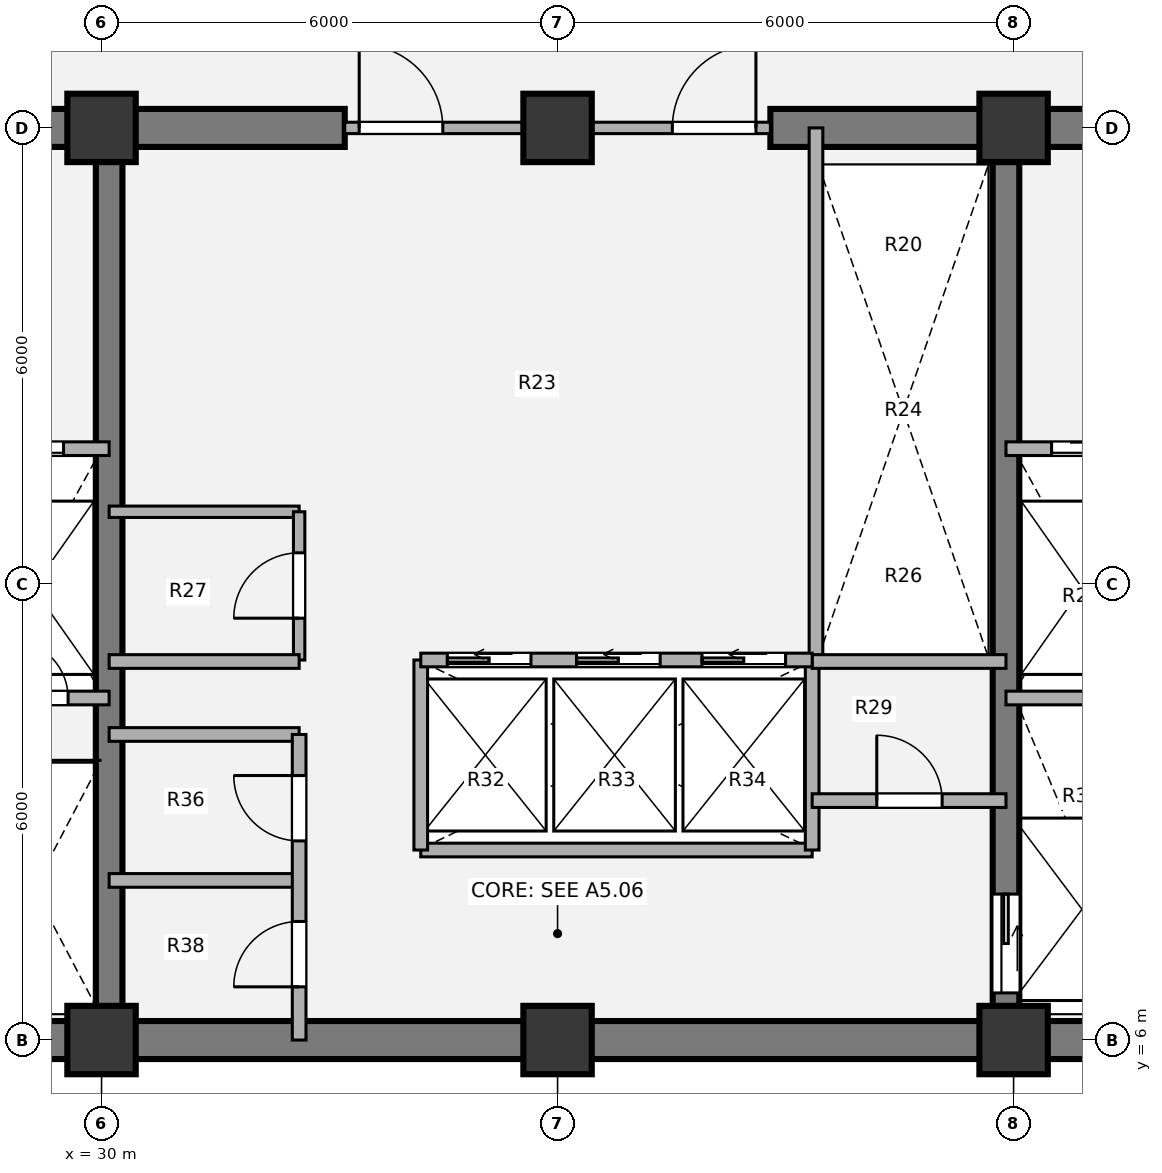
"""IFC4 building model, lengths in metres.
Left out: names, types, materials, properties, quantities, classifications, styles, units other than length and angle.
Written with IfcOpenShell. Run it as: python <this file> out.ifc"""

import sys

from ifc_helpers import new_model, si_unit, direction, frame, frame_2d, origin, origin_2d, place, context, subcontext, project, spatial, rectangle, extrude, source, transform, mapped, element, fill, save


model = new_model("IFC4")
c1 = context("Model", 3, precision=1e-05, world=origin(), true_north=direction((0.0, 1.0)))
c2 = subcontext(c1, "Body", "Model", "MODEL_VIEW")
j1 = project(units=[si_unit("LENGTHUNIT", "METRE"), si_unit("PLANEANGLEUNIT", "RADIAN")], contexts=[c1])
p1 = place(None, origin())
s1 = spatial("IfcSite", under=j1, at=p1, CompositionType="ELEMENT")
p2 = place(p1, origin())
s2 = spatial("IfcBuilding", under=s1, at=p2, CompositionType="ELEMENT")
p3 = place(p2, frame((0.0, 0.0, 138.96)))
s3 = spatial("IfcBuildingStorey", under=s2, at=p3, CompositionType="ELEMENT", Elevation=138.96)
m1 = source(origin(), c2, "Body", "SweptSolid", [
    extrude(rectangle(XDim=0.9, YDim=0.9, at=origin_2d()), origin(), (0.0, 0.0, 1.0), 3.78),
])
for number, where, z_axis, x_axis in (
    (1, (30.0, 6.0, 0.0), (0.0, 0.0, 1.0), (1.0, 0.0, 0.0)),
    (2, (36.0, 6.0, 0.0), (0.0, 0.0, 1.0), (1.0, 0.0, 0.0)),
    (3, (42.0, 6.0, 0.0), (0.0, 0.0, 1.0), (1.0, 0.0, 0.0)),
    (4, (30.0, 18.0, 0.0), (0.0, 0.0, 1.0), (1.0, 0.0, 0.0)),
    (5, (36.0, 18.0, 0.0), (0.0, 0.0, 1.0), (1.0, 0.0, 0.0)),
    (6, (42.0, 18.0, 0.0), (0.0, 0.0, 1.0), (1.0, 0.0, 0.0)),
):
    element("IfcColumn", number, at=place(p3, frame(where, z_axis=z_axis, x_axis=x_axis)), inside=s3, PredefinedType="COLUMN", context=c2, shape_type="MappedRepresentation", body=[
        mapped(m1, transform((0.0, 0.0, 0.0), x_axis=(1.0, 0.0, 0.0), y_axis=(0.0, 1.0, 0.0), z_axis=(0.0, 0.0, 1.0), scale=1.0)),
    ])
p4 = place(p3, frame((48.25, 6.0, 0.0), z_axis=(0.0, 0.0, 1.0), x_axis=(-1.0, 0.0, 0.0)))
e7 = element("IfcWall", 7, at=p4, inside=s3, PredefinedType="SHEAR", context=c2, shape_type="SweptSolid", body=[
    extrude(rectangle(XDim=24.5, YDim=0.5, at=frame_2d((12.25, 0.0))), origin(), (0.0, 0.0, 1.0), 3.78),
])
p5 = place(p3, frame((23.75, 18.0, 0.0), z_axis=(0.0, 0.0, 1.0), x_axis=(1.0, 0.0, 0.0)))
e8 = element("IfcWall", 8, at=p5, inside=s3, PredefinedType="SHEAR", context=c2, shape_type="SweptSolid", body=[
    extrude(rectangle(XDim=9.45, YDim=0.5, at=frame_2d((4.725, 0.0))), origin(), (0.0, 0.0, 1.0), 3.78),
])
p6 = place(p5, frame((2.95, 0.0, 0.0)))
e9 = element("IfcOpeningElement", 9, at=p6, cuts=e8, PredefinedType="OPENING", context=c2, shape_type="SweptSolid", body=[
    extrude(rectangle(XDim=1.1, YDim=2.1, at=origin_2d()), frame((0.55, 0.26, 1.05), z_axis=(0.0, -1.0, 0.0), x_axis=(1.0, 0.0, 0.0)), (0.0, 0.0, 1.0), 0.52),
])
p7 = place(p3, frame((38.8, 18.0, 0.0), z_axis=(0.0, 0.0, 1.0), x_axis=(1.0, 0.0, 0.0)))
e10 = element("IfcWall", 10, at=p7, inside=s3, PredefinedType="SHEAR", context=c2, shape_type="SweptSolid", body=[
    extrude(rectangle(XDim=9.45, YDim=0.5, at=frame_2d((4.725, 0.0))), origin(), (0.0, 0.0, 1.0), 3.78),
])
p8 = place(p7, frame((5.45, 0.0, 0.0)))
e11 = element("IfcOpeningElement", 11, at=p8, cuts=e10, PredefinedType="OPENING", context=c2, shape_type="SweptSolid", body=[
    extrude(rectangle(XDim=1.1, YDim=2.1, at=origin_2d()), frame((0.55, 0.26, 1.05), z_axis=(0.0, -1.0, 0.0), x_axis=(1.0, 0.0, 0.0)), (0.0, 0.0, 1.0), 0.52),
])
p9 = place(p3, frame((30.1, 6.0, 0.0), z_axis=(0.0, 0.0, 1.0), x_axis=(0.0, 1.0, 0.0)))
e12 = element("IfcWall", 12, at=p9, inside=s3, PredefinedType="SHEAR", context=c2, shape_type="SweptSolid", body=[
    extrude(rectangle(XDim=12.0, YDim=0.35, at=frame_2d((6.0, 0.0))), origin(), (0.0, 0.0, 1.0), 3.78),
])
p10 = place(p3, frame((41.9, 18.0, 0.0), z_axis=(0.0, 0.0, 1.0), x_axis=(0.0, -1.0, 0.0)))
e13 = element("IfcWall", 13, at=p10, inside=s3, PredefinedType="SHEAR", context=c2, shape_type="SweptSolid", body=[
    extrude(rectangle(XDim=12.0, YDim=0.35, at=frame_2d((6.0, 0.0))), origin(), (0.0, 0.0, 1.0), 3.78),
])
p11 = place(p10, frame((10.08, 0.0, 0.0)))
e14 = element("IfcOpeningElement", 14, at=p11, cuts=e13, PredefinedType="OPENING", context=c2, shape_type="SweptSolid", body=[
    extrude(rectangle(XDim=1.3, YDim=2.1, at=origin_2d()), frame((0.65, 0.185, 1.05), z_axis=(0.0, -1.0, 0.0), x_axis=(1.0, 0.0, 0.0)), (0.0, 0.0, 1.0), 0.37),
])
p12 = place(p3, frame((30.1, 12.95, 0.0), z_axis=(0.0, 0.0, 1.0), x_axis=(1.0, 0.0, 0.0)))
e15 = element("IfcWall", 15, at=p12, inside=s3, PredefinedType="PARTITIONING", context=c2, shape_type="SweptSolid", body=[
    extrude(rectangle(XDim=2.5, YDim=0.15, at=frame_2d((1.25, 0.0))), origin(), (0.0, 0.0, 1.0), 3.5),
])
p13 = place(p3, frame((32.6, 11.0, 0.0), z_axis=(0.0, 0.0, 1.0), x_axis=(0.0, 1.0, 0.0)))
e16 = element("IfcWall", 16, at=p13, inside=s3, PredefinedType="PARTITIONING", context=c2, shape_type="SweptSolid", body=[
    extrude(rectangle(XDim=1.95, YDim=0.15, at=frame_2d((0.975, 0.0))), origin(), (0.0, 0.0, 1.0), 3.5),
])
p14 = place(p13, frame((0.55, 0.0, 0.0)))
e17 = element("IfcOpeningElement", 17, at=p14, cuts=e16, PredefinedType="OPENING", context=c2, shape_type="SweptSolid", body=[
    extrude(rectangle(XDim=0.86, YDim=2.1, at=origin_2d()), frame((0.43, 0.085, 1.05), z_axis=(0.0, -1.0, 0.0), x_axis=(1.0, 0.0, 0.0)), (0.0, 0.0, 1.0), 0.17),
])
p15 = place(p3, frame((34.2, 8.5, 0.0), z_axis=(0.0, 0.0, 1.0), x_axis=(1.0, 0.0, 0.0)))
e18 = element("IfcWall", 18, at=p15, inside=s3, PredefinedType="PARTITIONING", context=c2, shape_type="SweptSolid", body=[
    extrude(rectangle(XDim=5.15, YDim=0.18, at=frame_2d((2.575, 0.0))), origin(), (0.0, 0.0, 1.0), 3.5),
])
for number, where, z_axis, x_axis in (
    (19, (34.2, 8.5, 0.0), (0.0, 0.0, 1.0), (0.0, 1.0, 0.0)),
    (20, (39.35, 8.5, 0.0), (0.0, 0.0, 1.0), (0.0, 1.0, 0.0)),
):
    element("IfcWall", number, at=place(p3, frame(where, z_axis=z_axis, x_axis=x_axis)), inside=s3, PredefinedType="PARTITIONING", context=c2, shape_type="SweptSolid", body=[
        extrude(rectangle(XDim=2.5, YDim=0.18, at=frame_2d((1.25, 0.0))), origin(), (0.0, 0.0, 1.0), 3.5),
    ])
p16 = place(p3, frame((39.4, 11.0, 0.0), z_axis=(0.0, 0.0, 1.0), x_axis=(0.0, 1.0, 0.0)))
e21 = element("IfcWall", 21, at=p16, inside=s3, PredefinedType="PARTITIONING", context=c2, shape_type="SweptSolid", body=[
    extrude(rectangle(XDim=7.0, YDim=0.18, at=frame_2d((3.5, 0.0))), origin(), (0.0, 0.0, 1.0), 3.5),
])
p17 = place(p3, frame((30.1, 10.98, 0.0), z_axis=(0.0, 0.0, 1.0), x_axis=(1.0, 0.0, 0.0)))
e22 = element("IfcWall", 22, at=p17, inside=s3, PredefinedType="PARTITIONING", context=c2, shape_type="SweptSolid", body=[
    extrude(rectangle(XDim=2.5, YDim=0.18, at=frame_2d((1.25, 0.0))), origin(), (0.0, 0.0, 1.0), 3.5),
])
p18 = place(p3, frame((39.35, 10.98, 0.0), z_axis=(0.0, 0.0, 1.0), x_axis=(1.0, 0.0, 0.0)))
e23 = element("IfcWall", 23, at=p18, inside=s3, PredefinedType="PARTITIONING", context=c2, shape_type="SweptSolid", body=[
    extrude(rectangle(XDim=2.55, YDim=0.18, at=frame_2d((1.275, 0.0))), origin(), (0.0, 0.0, 1.0), 3.5),
])
for number, where, z_axis, x_axis in (
    (24, (30.1, 8.1, 0.0), (0.0, 0.0, 1.0), (1.0, 0.0, 0.0)),
    (25, (30.1, 10.02, 0.0), (0.0, 0.0, 1.0), (1.0, 0.0, 0.0)),
):
    element("IfcWall", number, at=place(p3, frame(where, z_axis=z_axis, x_axis=x_axis)), inside=s3, PredefinedType="PARTITIONING", context=c2, shape_type="SweptSolid", body=[
        extrude(rectangle(XDim=2.5, YDim=0.18, at=frame_2d((1.25, 0.0))), origin(), (0.0, 0.0, 1.0), 3.5),
    ])
p19 = place(p3, frame((32.6, 6.0, 0.0), z_axis=(0.0, 0.0, 1.0), x_axis=(0.0, 1.0, 0.0)))
e26 = element("IfcWall", 26, at=p19, inside=s3, PredefinedType="PARTITIONING", context=c2, shape_type="SweptSolid", body=[
    extrude(rectangle(XDim=4.02, YDim=0.18, at=frame_2d((2.01, 0.0))), origin(), (0.0, 0.0, 1.0), 3.5),
])
p20 = place(p19, frame((0.7, 0.0, 0.0)))
e27 = element("IfcOpeningElement", 27, at=p20, cuts=e26, PredefinedType="OPENING", context=c2, shape_type="SweptSolid", body=[
    extrude(rectangle(XDim=0.86, YDim=2.1, at=origin_2d()), frame((0.43, 0.1, 1.05), z_axis=(0.0, -1.0, 0.0), x_axis=(1.0, 0.0, 0.0)), (0.0, 0.0, 1.0), 0.2),
])
p21 = place(p19, frame((2.62, 0.0, 0.0)))
e28 = element("IfcOpeningElement", 28, at=p21, cuts=e26, PredefinedType="OPENING", context=c2, shape_type="SweptSolid", body=[
    extrude(rectangle(XDim=0.86, YDim=2.1, at=origin_2d()), frame((0.43, 0.1, 1.05), z_axis=(0.0, -1.0, 0.0), x_axis=(1.0, 0.0, 0.0)), (0.0, 0.0, 1.0), 0.2),
])
p22 = place(p3, frame((39.35, 9.15, 0.0), z_axis=(0.0, 0.0, 1.0), x_axis=(1.0, 0.0, 0.0)))
e29 = element("IfcWall", 29, at=p22, inside=s3, PredefinedType="PARTITIONING", context=c2, shape_type="SweptSolid", body=[
    extrude(rectangle(XDim=2.55, YDim=0.18, at=frame_2d((1.275, 0.0))), origin(), (0.0, 0.0, 1.0), 3.5),
])
p23 = place(p22, frame((0.85, 0.0, 0.0)))
e30 = element("IfcOpeningElement", 30, at=p23, cuts=e29, PredefinedType="OPENING", context=c2, shape_type="SweptSolid", body=[
    extrude(rectangle(XDim=0.86, YDim=2.1, at=origin_2d()), frame((0.43, 0.1, 1.05), z_axis=(0.0, -1.0, 0.0), x_axis=(1.0, 0.0, 0.0)), (0.0, 0.0, 1.0), 0.2),
])
p24 = place(p3, frame((33.2, 18.0, 0.0), z_axis=(0.0, 0.0, 1.0), x_axis=(1.0, 0.0, 0.0)))
e31 = element("IfcWall", 31, at=p24, inside=s3, PredefinedType="PARTITIONING", context=c2, shape_type="SweptSolid", body=[
    extrude(rectangle(XDim=5.6, YDim=0.15, at=frame_2d((2.8, 0.0))), origin(), (0.0, 0.0, 1.0), 2.315),
])
p25 = place(p24, frame((0.19, 0.0, 0.0)))
e32 = element("IfcOpeningElement", 32, at=p25, cuts=e31, PredefinedType="OPENING", context=c2, shape_type="SweptSolid", body=[
    extrude(rectangle(XDim=1.1, YDim=2.1, at=origin_2d()), frame((0.55, 0.085, 1.05), z_axis=(0.0, -1.0, 0.0), x_axis=(1.0, 0.0, 0.0)), (0.0, 0.0, 1.0), 0.17),
])
p26 = place(p24, frame((4.31, 0.0, 0.0)))
e33 = element("IfcOpeningElement", 33, at=p26, cuts=e31, PredefinedType="OPENING", context=c2, shape_type="SweptSolid", body=[
    extrude(rectangle(XDim=1.1, YDim=2.1, at=origin_2d()), frame((0.55, 0.085, 1.05), z_axis=(0.0, -1.0, 0.0), x_axis=(1.0, 0.0, 0.0)), (0.0, 0.0, 1.0), 0.17),
])
p27 = place(p3, frame((24.0, 13.78, 0.0), z_axis=(0.0, 0.0, 1.0), x_axis=(1.0, 0.0, 0.0)))
e34 = element("IfcWall", 34, at=p27, inside=s3, PredefinedType="PARTITIONING", context=c2, shape_type="SweptSolid", body=[
    extrude(rectangle(XDim=6.1, YDim=0.18, at=frame_2d((3.05, 0.0))), origin(), (0.0, 0.0, 1.0), 3.5),
])
p28 = place(p27, frame((1.15, 0.0, 0.0)))
e35 = element("IfcOpeningElement", 35, at=p28, cuts=e34, PredefinedType="OPENING", context=c2, shape_type="SweptSolid", body=[
    extrude(rectangle(XDim=1.1, YDim=2.1, at=origin_2d()), frame((0.55, 0.1, 1.05), z_axis=(0.0, -1.0, 0.0), x_axis=(1.0, 0.0, 0.0)), (0.0, 0.0, 1.0), 0.2),
])
p29 = place(p27, frame((4.4, 0.0, 0.0)))
e36 = element("IfcOpeningElement", 36, at=p29, cuts=e34, PredefinedType="OPENING", context=c2, shape_type="SweptSolid", body=[
    extrude(rectangle(XDim=1.1, YDim=2.1, at=origin_2d()), frame((0.55, 0.1, 1.05), z_axis=(0.0, -1.0, 0.0), x_axis=(1.0, 0.0, 0.0)), (0.0, 0.0, 1.0), 0.2),
])
p30 = place(p3, frame((28.15, 10.5, 0.0), z_axis=(0.0, 0.0, 1.0), x_axis=(1.0, 0.0, 0.0)))
e37 = element("IfcWall", 37, at=p30, inside=s3, PredefinedType="PARTITIONING", context=c2, shape_type="SweptSolid", body=[
    extrude(rectangle(XDim=1.95, YDim=0.18, at=frame_2d((0.975, 0.0))), origin(), (0.0, 0.0, 1.0), 3.5),
])
p31 = place(p30, frame((0.65, 0.0, 0.0)))
e38 = element("IfcOpeningElement", 38, at=p31, cuts=e37, PredefinedType="OPENING", context=c2, shape_type="SweptSolid", body=[
    extrude(rectangle(XDim=0.76, YDim=2.05, at=origin_2d()), frame((0.38, 0.1, 1.025), z_axis=(0.0, -1.0, 0.0), x_axis=(1.0, 0.0, 0.0)), (0.0, 0.0, 1.0), 0.2),
])
p32 = place(p3, frame((41.9, 13.78, 0.0), z_axis=(0.0, 0.0, 1.0), x_axis=(1.0, 0.0, 0.0)))
e39 = element("IfcWall", 39, at=p32, inside=s3, PredefinedType="PARTITIONING", context=c2, shape_type="SweptSolid", body=[
    extrude(rectangle(XDim=6.1, YDim=0.18, at=frame_2d((3.05, 0.0))), origin(), (0.0, 0.0, 1.0), 3.5),
])
p33 = place(p32, frame((0.6, 0.0, 0.0)))
e40 = element("IfcOpeningElement", 40, at=p33, cuts=e39, PredefinedType="OPENING", context=c2, shape_type="SweptSolid", body=[
    extrude(rectangle(XDim=1.1, YDim=2.1, at=origin_2d()), frame((0.55, 0.1, 1.05), z_axis=(0.0, -1.0, 0.0), x_axis=(1.0, 0.0, 0.0)), (0.0, 0.0, 1.0), 0.2),
])
p34 = place(p32, frame((3.8, 0.0, 0.0)))
e41 = element("IfcOpeningElement", 41, at=p34, cuts=e39, PredefinedType="OPENING", context=c2, shape_type="SweptSolid", body=[
    extrude(rectangle(XDim=1.1, YDim=2.1, at=origin_2d()), frame((0.55, 0.1, 1.05), z_axis=(0.0, -1.0, 0.0), x_axis=(1.0, 0.0, 0.0)), (0.0, 0.0, 1.0), 0.2),
])
p35 = place(p3, frame((41.9, 10.5, 0.0), z_axis=(0.0, 0.0, 1.0), x_axis=(1.0, 0.0, 0.0)))
e42 = element("IfcWall", 42, at=p35, inside=s3, PredefinedType="PARTITIONING", context=c2, shape_type="SweptSolid", body=[
    extrude(rectangle(XDim=1.95, YDim=0.18, at=frame_2d((0.975, 0.0))), origin(), (0.0, 0.0, 1.0), 3.5),
])
p36 = place(p3, frame((34.2, 11.0, 0.0), z_axis=(0.0, 0.0, 1.0), x_axis=(1.0, 0.0, 0.0)))
e43 = element("IfcWall", 43, at=p36, inside=s3, PredefinedType="PARTITIONING", context=c2, shape_type="SweptSolid", body=[
    extrude(rectangle(XDim=5.15, YDim=0.18, at=frame_2d((2.575, 0.0))), origin(), (0.0, 0.0, 1.0), 3.5),
])
p37 = place(p36, frame((0.35, 0.0, 0.0)))
e44 = element("IfcOpeningElement", 44, at=p37, cuts=e43, PredefinedType="OPENING", context=c2, shape_type="SweptSolid", body=[
    extrude(rectangle(XDim=1.1, YDim=2.1, at=origin_2d()), frame((0.55, 0.1, 1.05), z_axis=(0.0, -1.0, 0.0), x_axis=(1.0, 0.0, 0.0)), (0.0, 0.0, 1.0), 0.2),
])
p38 = place(p36, frame((2.05, 0.0, 0.0)))
e45 = element("IfcOpeningElement", 45, at=p38, cuts=e43, PredefinedType="OPENING", context=c2, shape_type="SweptSolid", body=[
    extrude(rectangle(XDim=1.1, YDim=2.1, at=origin_2d()), frame((0.55, 0.1, 1.05), z_axis=(0.0, -1.0, 0.0), x_axis=(1.0, 0.0, 0.0)), (0.0, 0.0, 1.0), 0.2),
])
p39 = place(p36, frame((3.7, 0.0, 0.0)))
e46 = element("IfcOpeningElement", 46, at=p39, cuts=e43, PredefinedType="OPENING", context=c2, shape_type="SweptSolid", body=[
    extrude(rectangle(XDim=1.1, YDim=2.1, at=origin_2d()), frame((0.55, 0.1, 1.05), z_axis=(0.0, -1.0, 0.0), x_axis=(1.0, 0.0, 0.0)), (0.0, 0.0, 1.0), 0.2),
])
m2 = source(origin(), c2, "Body", "SweptSolid", [
    extrude(rectangle(XDim=0.86, YDim=2.1, at=origin_2d()), frame((0.43, 0.025, 1.05), z_axis=(0.0, -1.0, 0.0), x_axis=(1.0, 0.0, 0.0)), (0.0, 0.0, 1.0), 0.05),
])
p40 = place(p14, origin())
e47 = element("IfcDoor", 47, at=p40, inside=s3, OperationType="SINGLE_SWING_LEFT", PredefinedType="DOOR", context=c2, shape_type="MappedRepresentation", body=[
    mapped(m2, transform((0.0, 0.0, 0.0), x_axis=(1.0, 0.0, 0.0), y_axis=(0.0, 1.0, 0.0), z_axis=(0.0, 0.0, 1.0), scale=1.0)),
])
fill(e17, e47)
p41 = place(p20, origin())
e48 = element("IfcDoor", 48, at=p41, inside=s3, OperationType="SINGLE_SWING_LEFT", PredefinedType="DOOR", context=c2, shape_type="MappedRepresentation", body=[
    mapped(m2, transform((0.0, 0.0, 0.0), x_axis=(1.0, 0.0, 0.0), y_axis=(0.0, 1.0, 0.0), z_axis=(0.0, 0.0, 1.0), scale=1.0)),
])
fill(e27, e48)
p42 = place(p21, origin())
e49 = element("IfcDoor", 49, at=p42, inside=s3, OperationType="SINGLE_SWING_RIGHT", PredefinedType="DOOR", context=c2, shape_type="MappedRepresentation", body=[
    mapped(m2, transform((0.0, 0.0, 0.0), x_axis=(1.0, 0.0, 0.0), y_axis=(0.0, 1.0, 0.0), z_axis=(0.0, 0.0, 1.0), scale=1.0)),
])
fill(e28, e49)
p43 = place(p23, origin())
e50 = element("IfcDoor", 50, at=p43, inside=s3, OperationType="SINGLE_SWING_LEFT", PredefinedType="DOOR", context=c2, shape_type="MappedRepresentation", body=[
    mapped(m2, transform((0.0, 0.0, 0.0), x_axis=(1.0, 0.0, 0.0), y_axis=(0.0, 1.0, 0.0), z_axis=(0.0, 0.0, 1.0), scale=1.0)),
])
fill(e30, e50)
m3 = source(origin(), c2, "Body", "SweptSolid", [
    extrude(rectangle(XDim=1.1, YDim=2.1, at=origin_2d()), frame((0.55, 0.025, 1.05), z_axis=(0.0, -1.0, 0.0), x_axis=(1.0, 0.0, 0.0)), (0.0, 0.0, 1.0), 0.05),
])
p44 = place(p25, origin())
e51 = element("IfcDoor", 51, at=p44, inside=s3, OperationType="SINGLE_SWING_LEFT", PredefinedType="DOOR", context=c2, shape_type="MappedRepresentation", body=[
    mapped(m3, transform((0.0, 0.0, 0.0), x_axis=(1.0, 0.0, 0.0), y_axis=(0.0, 1.0, 0.0), z_axis=(0.0, 0.0, 1.0), scale=1.0)),
])
fill(e32, e51)
p45 = place(p26, origin())
e52 = element("IfcDoor", 52, at=p45, inside=s3, OperationType="SINGLE_SWING_RIGHT", PredefinedType="DOOR", context=c2, shape_type="MappedRepresentation", body=[
    mapped(m3, transform((0.0, 0.0, 0.0), x_axis=(1.0, 0.0, 0.0), y_axis=(0.0, 1.0, 0.0), z_axis=(0.0, 0.0, 1.0), scale=1.0)),
])
fill(e33, e52)
m4 = source(origin(), c2, "Body", "SweptSolid", [
    extrude(rectangle(XDim=1.1, YDim=2.1, at=origin_2d()), frame((0.55, 0.025, 1.05), z_axis=(0.0, -1.0, 0.0), x_axis=(1.0, 0.0, 0.0)), (0.0, 0.0, 1.0), 0.05),
])
p46 = place(p29, origin())
e53 = element("IfcDoor", 53, at=p46, inside=s3, OperationType="SLIDING_TO_LEFT", PredefinedType="DOOR", context=c2, shape_type="MappedRepresentation", body=[
    mapped(m4, transform((0.0, 0.0, 0.0), x_axis=(1.0, 0.0, 0.0), y_axis=(0.0, 1.0, 0.0), z_axis=(0.0, 0.0, 1.0), scale=1.0)),
])
fill(e36, e53)
m5 = source(origin(), c2, "Body", "SweptSolid", [
    extrude(rectangle(XDim=0.76, YDim=2.05, at=origin_2d()), frame((0.38, 0.025, 1.025), z_axis=(0.0, -1.0, 0.0), x_axis=(1.0, 0.0, 0.0)), (0.0, 0.0, 1.0), 0.05),
])
p47 = place(p31, origin())
e54 = element("IfcDoor", 54, at=p47, inside=s3, OperationType="SINGLE_SWING_LEFT", PredefinedType="DOOR", context=c2, shape_type="MappedRepresentation", body=[
    mapped(m5, transform((0.0, 0.0, 0.0), x_axis=(1.0, 0.0, 0.0), y_axis=(0.0, 1.0, 0.0), z_axis=(0.0, 0.0, 1.0), scale=1.0)),
])
fill(e38, e54)
p48 = place(p33, origin())
e55 = element("IfcDoor", 55, at=p48, inside=s3, OperationType="SLIDING_TO_RIGHT", PredefinedType="DOOR", context=c2, shape_type="MappedRepresentation", body=[
    mapped(m4, transform((0.0, 0.0, 0.0), x_axis=(1.0, 0.0, 0.0), y_axis=(0.0, 1.0, 0.0), z_axis=(0.0, 0.0, 1.0), scale=1.0)),
])
fill(e40, e55)
m6 = source(origin(), c2, "Body", "SweptSolid", [
    extrude(rectangle(XDim=1.3, YDim=2.1, at=origin_2d()), frame((0.65, 0.025, 1.05), z_axis=(0.0, -1.0, 0.0), x_axis=(1.0, 0.0, 0.0)), (0.0, 0.0, 1.0), 0.05),
])
p49 = place(p11, origin())
e56 = element("IfcDoor", 56, at=p49, inside=s3, OperationType="SLIDING_TO_LEFT", PredefinedType="DOOR", context=c2, shape_type="MappedRepresentation", body=[
    mapped(m6, transform((0.0, 0.0, 0.0), x_axis=(1.0, 0.0, 0.0), y_axis=(0.0, 1.0, 0.0), z_axis=(0.0, 0.0, 1.0), scale=1.0)),
])
fill(e14, e56)
p50 = place(p37, origin())
e57 = element("IfcDoor", 57, at=p50, inside=s3, OperationType="SLIDING_TO_LEFT", PredefinedType="DOOR", context=c2, shape_type="MappedRepresentation", body=[
    mapped(m4, transform((0.0, 0.0, 0.0), x_axis=(1.0, 0.0, 0.0), y_axis=(0.0, 1.0, 0.0), z_axis=(0.0, 0.0, 1.0), scale=1.0)),
])
fill(e44, e57)
p51 = place(p38, origin())
e58 = element("IfcDoor", 58, at=p51, inside=s3, OperationType="SLIDING_TO_LEFT", PredefinedType="DOOR", context=c2, shape_type="MappedRepresentation", body=[
    mapped(m4, transform((0.0, 0.0, 0.0), x_axis=(1.0, 0.0, 0.0), y_axis=(0.0, 1.0, 0.0), z_axis=(0.0, 0.0, 1.0), scale=1.0)),
])
fill(e45, e58)
p52 = place(p39, origin())
e59 = element("IfcDoor", 59, at=p52, inside=s3, OperationType="SLIDING_TO_LEFT", PredefinedType="DOOR", context=c2, shape_type="MappedRepresentation", body=[
    mapped(m4, transform((0.0, 0.0, 0.0), x_axis=(1.0, 0.0, 0.0), y_axis=(0.0, 1.0, 0.0), z_axis=(0.0, 0.0, 1.0), scale=1.0)),
])
fill(e46, e59)
save(model, sys.argv[1])
